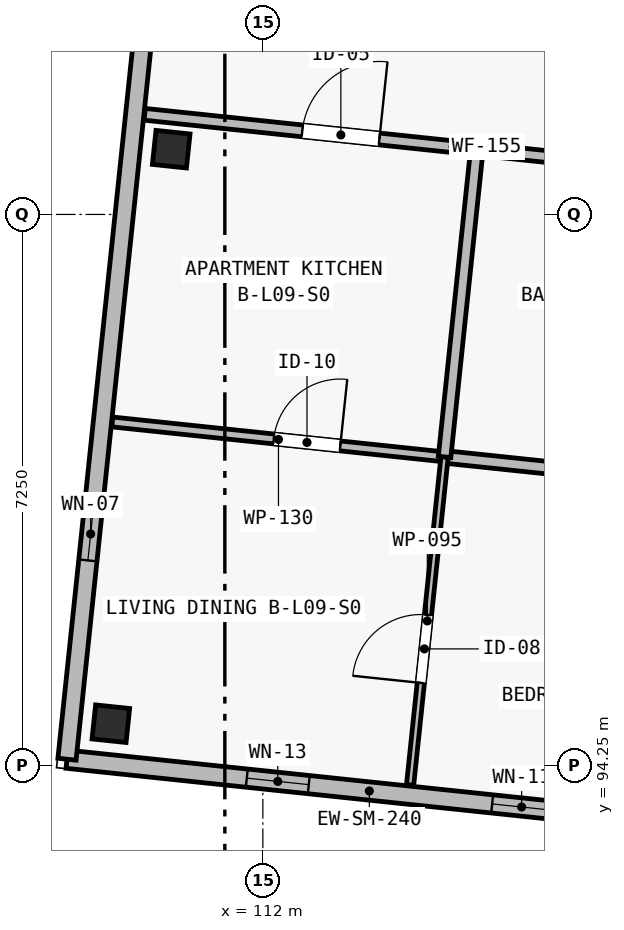
"""IFC4 building model, lengths in metres.
Left out: names, types, materials, properties, quantities, classifications, styles, units other than length and angle.
Written with IfcOpenShell. Run it as: python <this file> out.ifc"""

import sys

from ifc_helpers import new_model, si_unit, direction, frame, frame_2d, origin, origin_2d, place, context, subcontext, project, spatial, polyline, rectangle, outline, extrude, element, fill, save


model = new_model("IFC4")
c1 = context("Model", 3, precision=1e-05, world=origin(), true_north=direction((0.0, 1.0)))
c2 = subcontext(c1, "Body", "Model", "MODEL_VIEW")
j1 = project(units=[si_unit("LENGTHUNIT", "METRE"), si_unit("PLANEANGLEUNIT", "RADIAN")], contexts=[c1])
p1 = place(None, origin())
s1 = spatial("IfcSite", under=j1, at=p1, CompositionType="ELEMENT")
p2 = place(p1, origin())
s2 = spatial("IfcBuilding", under=s1, at=p2, CompositionType="ELEMENT")
p3 = place(p2, frame((0.0, 0.0, 31.15)))
s3 = spatial("IfcBuildingStorey", under=s2, at=p3, CompositionType="ELEMENT", Elevation=31.15)
for number, where, z_axis, x_axis in (
    (1, (110.0, 94.8, 0.0), (0.0, 0.0, 1.0), (0.995, -0.105, 0.0)),
    (2, (110.794, 102.358, 0.0), (0.0, 0.0, 1.0), (0.995, -0.105, 0.0)),
):
    element("IfcColumn", number, at=place(p3, frame(where, z_axis=z_axis, x_axis=x_axis)), inside=s3, PredefinedType="COLUMN", context=c2, shape_type="SweptSolid", body=[
        extrude(rectangle(XDim=0.45, YDim=0.45, at=origin_2d()), origin(), (0.0, 0.0, 1.0), 4.697),
    ])
p4 = place(p3, frame((117.379, 93.497, 0.0), z_axis=(0.0, 0.0, 1.0), x_axis=(-0.994522329422, 0.104524333444, 0.0)))
e3 = element("IfcWall", 3, at=p4, inside=s3, PredefinedType="SOLIDWALL", context=c2, shape_type="SweptSolid", body=[
    extrude(outline(polyline([(0.0, 0.0), (8.0, 0.0), (8.0, 5.084), (0.0, 6.569), (0.0, 0.0)])), frame((0.0, 0.12, 0.0), z_axis=(0.0, -1.0, 0.0), x_axis=(1.0, 0.0, 0.0)), (0.0, 0.0, 1.0), 0.24),
])
p5 = place(p4, frame((0.085, 0.0, 0.42)))
e4 = element("IfcOpeningElement", 4, at=p5, cuts=e3, PredefinedType="OPENING", context=c2, shape_type="SweptSolid", body=[
    extrude(rectangle(XDim=0.76, YDim=2.34, at=frame_2d((0.38, 1.17))), frame((0.0, 0.135, 0.0), z_axis=(0.0, -1.0, 0.0), x_axis=(1.0, 0.0, 0.0)), (0.0, 0.0, 1.0), 0.27),
])
p6 = place(p4, frame((1.595, 0.0, 0.48)))
e5 = element("IfcOpeningElement", 5, at=p6, cuts=e3, PredefinedType="OPENING", context=c2, shape_type="SweptSolid", body=[
    extrude(rectangle(XDim=0.78, YDim=2.2, at=frame_2d((0.39, 1.1))), frame((0.0, 0.135, 0.0), z_axis=(0.0, -1.0, 0.0), x_axis=(1.0, 0.0, 0.0)), (0.0, 0.0, 1.0), 0.27),
])
p7 = place(p4, frame((4.801, 0.0, 0.42)))
e6 = element("IfcOpeningElement", 6, at=p7, cuts=e3, PredefinedType="OPENING", context=c2, shape_type="SweptSolid", body=[
    extrude(rectangle(XDim=0.82, YDim=2.18, at=frame_2d((0.41, 1.09))), frame((0.0, 0.135, 0.0), z_axis=(0.0, -1.0, 0.0), x_axis=(1.0, 0.0, 0.0)), (0.0, 0.0, 1.0), 0.27),
])
p8 = place(p3, frame((109.423, 94.333, 0.0), z_axis=(0.0, 0.0, 1.0), x_axis=(0.1045253859, 0.994522218808, 0.0)))
e7 = element("IfcWall", 7, at=p8, inside=s3, PredefinedType="SOLIDWALL", context=c2, shape_type="SweptSolid", body=[
    extrude(rectangle(XDim=20.65, YDim=0.24, at=frame_2d((10.325, 0.0))), origin(), (0.0, 0.0, 1.0), 5.084),
])
p9 = place(p8, frame((2.63, 0.0, 0.52)))
e8 = element("IfcOpeningElement", 8, at=p9, cuts=e7, PredefinedType="OPENING", context=c2, shape_type="SweptSolid", body=[
    extrude(rectangle(XDim=0.7, YDim=2.36, at=frame_2d((0.35, 1.18))), frame((0.0, 0.135, 0.0), z_axis=(0.0, -1.0, 0.0), x_axis=(1.0, 0.0, 0.0)), (0.0, 0.0, 1.0), 0.27),
])
p10 = place(p8, frame((16.82, 0.0, 0.45)))
e9 = element("IfcOpeningElement", 9, at=p10, cuts=e7, PredefinedType="OPENING", context=c2, shape_type="SweptSolid", body=[
    extrude(rectangle(XDim=0.84, YDim=2.28, at=frame_2d((0.42, 1.14))), frame((0.0, 0.135, 0.0), z_axis=(0.0, -1.0, 0.0), x_axis=(1.0, 0.0, 0.0)), (0.0, 0.0, 1.0), 0.27),
])
p11 = place(p3, frame((110.446, 102.817, 0.0), z_axis=(0.0, 0.0, 1.0), x_axis=(0.994520852686, -0.104538383252, 0.0)))
e10 = element("IfcWall", 10, at=p11, inside=s3, PredefinedType="PARTITIONING", context=c2, shape_type="SweptSolid", body=[
    extrude(rectangle(XDim=8.16, YDim=0.155, at=frame_2d((4.08, 0.0))), origin(), (0.0, 0.0, 1.0), 2.97),
])
p12 = place(p11, frame((2.085, 0.0, 0.0)))
e11 = element("IfcOpeningElement", 11, at=p12, cuts=e10, PredefinedType="OPENING", context=c2, shape_type="SweptSolid", body=[
    extrude(rectangle(XDim=1.02, YDim=2.2, at=frame_2d((0.51, 1.1))), frame((0.0, 0.093, 0.0), z_axis=(0.0, -1.0, 0.0), x_axis=(1.0, 0.0, 0.0)), (0.0, 0.0, 1.0), 0.185),
])
p13 = place(p3, frame((110.02, 98.77, 0.0), z_axis=(0.0, 0.0, 1.0), x_axis=(0.994525828039, -0.104491039633, 0.0)))
e12 = element("IfcWall", 12, at=p13, inside=s3, PredefinedType="PARTITIONING", context=c2, shape_type="SweptSolid", body=[
    extrude(rectangle(XDim=4.395, YDim=0.13, at=frame_2d((2.198, 0.0))), origin(), (0.0, 0.0, 1.0), 2.97),
])
p14 = place(p13, frame((2.135, 0.0, 0.0)))
e13 = element("IfcOpeningElement", 13, at=p14, cuts=e12, PredefinedType="OPENING", context=c2, shape_type="SweptSolid", body=[
    extrude(rectangle(XDim=0.88, YDim=2.1, at=frame_2d((0.44, 1.05))), frame((0.0, 0.08, 0.0), z_axis=(0.0, -1.0, 0.0), x_axis=(1.0, 0.0, 0.0)), (0.0, 0.0, 1.0), 0.16),
])
p15 = place(p3, frame((114.391, 98.31, 0.0), z_axis=(0.0, 0.0, 1.0), x_axis=(0.994517841934, -0.104567021925, 0.0)))
e14 = element("IfcWall", 14, at=p15, inside=s3, PredefinedType="PLUMBINGWALL", context=c2, shape_type="SweptSolid", body=[
    extrude(rectangle(XDim=3.885, YDim=0.165, at=frame_2d((1.942, 0.0))), origin(), (0.0, 0.0, 1.0), 2.97),
])
p16 = place(p15, frame((1.4, 0.0, 0.0)))
e15 = element("IfcOpeningElement", 15, at=p16, cuts=e14, PredefinedType="OPENING", context=c2, shape_type="SweptSolid", body=[
    extrude(rectangle(XDim=0.82, YDim=2.08, at=frame_2d((0.41, 1.04))), frame((0.0, 0.097, 0.0), z_axis=(0.0, -1.0, 0.0), x_axis=(1.0, 0.0, 0.0)), (0.0, 0.0, 1.0), 0.195),
])
p17 = place(p3, frame((113.937, 93.994, 0.0), z_axis=(0.0, 0.0, 1.0), x_axis=(0.104520797474, 0.994522701046, 0.0)))
e16 = element("IfcWall", 16, at=p17, inside=s3, PredefinedType="PARTITIONING", context=c2, shape_type="SweptSolid", body=[
    extrude(rectangle(XDim=4.34, YDim=0.095, at=frame_2d((2.17, 0.0))), origin(), (0.0, 0.0, 1.0), 2.97),
])
p18 = place(p17, frame((1.35, 0.0, 0.0)))
e17 = element("IfcOpeningElement", 17, at=p18, cuts=e16, PredefinedType="OPENING", context=c2, shape_type="SweptSolid", body=[
    extrude(rectangle(XDim=0.9, YDim=2.1, at=frame_2d((0.45, 1.05))), frame((0.0, 0.062, 0.0), z_axis=(0.0, -1.0, 0.0), x_axis=(1.0, 0.0, 0.0)), (0.0, 0.0, 1.0), 0.125),
])
p19 = place(p3, frame((114.391, 98.31, 0.0), z_axis=(0.0, 0.0, 1.0), x_axis=(0.104556757316, 0.994518921137, 0.0)))
e18 = element("IfcWall", 18, at=p19, inside=s3, PredefinedType="PLUMBINGWALL", context=c2, shape_type="SweptSolid", body=[
    extrude(rectangle(XDim=4.07, YDim=0.165, at=frame_2d((2.035, 0.0))), origin(), (0.0, 0.0, 1.0), 2.97),
])
p20 = place(p6, origin())
e19 = element("IfcWindow", 19, at=p20, inside=s3, PartitioningType="SINGLE_PANEL", PredefinedType="WINDOW", context=c2, shape_type="SweptSolid", body=[
    extrude(rectangle(XDim=0.78, YDim=2.2, at=frame_2d((0.39, 1.1))), frame((0.0, 0.03, 0.0), z_axis=(0.0, -1.0, 0.0), x_axis=(1.0, 0.0, 0.0)), (0.0, 0.0, 1.0), 0.06),
])
fill(e5, e19)
p21 = place(p7, origin())
e20 = element("IfcWindow", 20, at=p21, inside=s3, PartitioningType="SINGLE_PANEL", PredefinedType="WINDOW", context=c2, shape_type="SweptSolid", body=[
    extrude(rectangle(XDim=0.82, YDim=2.18, at=frame_2d((0.41, 1.09))), frame((0.0, 0.03, 0.0), z_axis=(0.0, -1.0, 0.0), x_axis=(1.0, 0.0, 0.0)), (0.0, 0.0, 1.0), 0.06),
])
fill(e6, e20)
p22 = place(p9, origin())
e21 = element("IfcWindow", 21, at=p22, inside=s3, PartitioningType="SINGLE_PANEL", PredefinedType="WINDOW", context=c2, shape_type="SweptSolid", body=[
    extrude(rectangle(XDim=0.7, YDim=2.36, at=frame_2d((0.35, 1.18))), frame((0.0, 0.03, 0.0), z_axis=(0.0, -1.0, 0.0), x_axis=(1.0, 0.0, 0.0)), (0.0, 0.0, 1.0), 0.06),
])
fill(e8, e21)
p23 = place(p12, origin())
e22 = element("IfcDoor", 22, at=p23, inside=s3, OperationType="SINGLE_SWING_RIGHT", PredefinedType="DOOR", context=c2, shape_type="SweptSolid", body=[
    extrude(rectangle(XDim=1.02, YDim=2.2, at=frame_2d((0.51, 1.1))), frame((0.0, 0.025, 0.0), z_axis=(0.0, -1.0, 0.0), x_axis=(1.0, 0.0, 0.0)), (0.0, 0.0, 1.0), 0.05),
])
fill(e11, e22)
p24 = place(p14, origin())
e23 = element("IfcDoor", 23, at=p24, inside=s3, OperationType="SINGLE_SWING_RIGHT", PredefinedType="DOOR", context=c2, shape_type="SweptSolid", body=[
    extrude(rectangle(XDim=0.88, YDim=2.1, at=frame_2d((0.44, 1.05))), frame((0.0, 0.025, 0.0), z_axis=(0.0, -1.0, 0.0), x_axis=(1.0, 0.0, 0.0)), (0.0, 0.0, 1.0), 0.05),
])
fill(e13, e23)
p25 = place(p18, origin())
e24 = element("IfcDoor", 24, at=p25, inside=s3, OperationType="SINGLE_SWING_LEFT", PredefinedType="DOOR", context=c2, shape_type="SweptSolid", body=[
    extrude(rectangle(XDim=0.9, YDim=2.1, at=frame_2d((0.45, 1.05))), frame((0.0, 0.025, 0.0), z_axis=(0.0, -1.0, 0.0), x_axis=(1.0, 0.0, 0.0)), (0.0, 0.0, 1.0), 0.05),
])
fill(e17, e24)
save(model, sys.argv[1])
